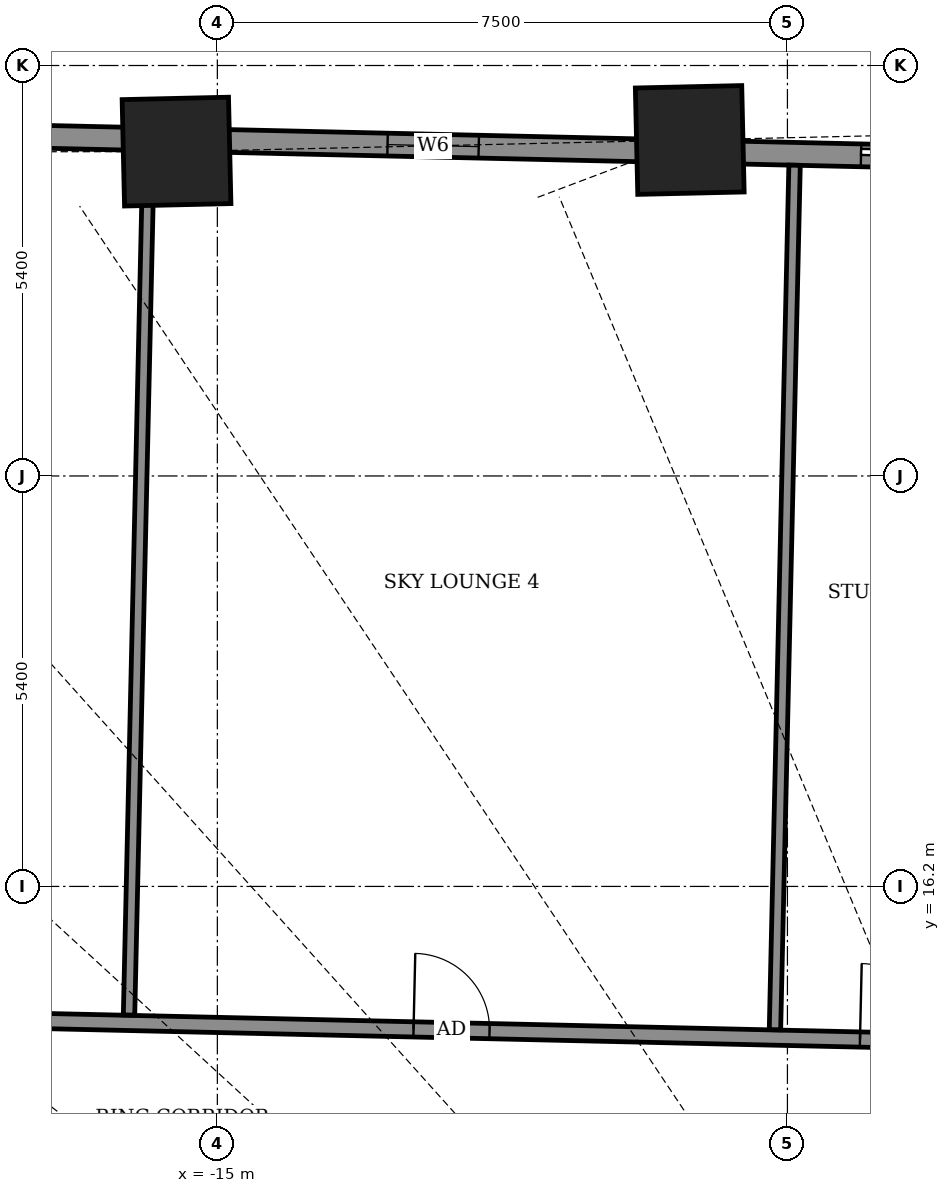
"""IFC4 building model, lengths in metres.
Left out: names, types, materials, properties, quantities, classifications, styles, units other than length and angle.
Written with IfcOpenShell. Run it as: python <this file> out.ifc"""

import sys

from ifc_helpers import new_model, si_unit, direction, frame, frame_2d, origin, origin_2d, place, context, subcontext, project, spatial, rectangle, extrude, element, fill, save


model = new_model("IFC4")
c1 = context("Model", 3, precision=1e-05, world=origin(), true_north=direction((0.0, 1.0)))
c2 = subcontext(c1, "Body", "Model", "MODEL_VIEW")
j1 = project(units=[si_unit("LENGTHUNIT", "METRE"), si_unit("PLANEANGLEUNIT", "RADIAN")], contexts=[c1])
p1 = place(None, origin())
s1 = spatial("IfcSite", under=j1, at=p1, CompositionType="ELEMENT")
p2 = place(p1, origin())
s2 = spatial("IfcBuilding", under=s1, at=p2, CompositionType="ELEMENT")
p3 = place(p2, frame((0.0, 0.0, 97.3)))
s3 = spatial("IfcBuildingStorey", under=s2, at=p3, CompositionType="ELEMENT", Elevation=97.3)
for number, where, z_axis, x_axis in (
    (1, (-8.785, 26.02, -0.55), (0.0, 0.0, 1.0), (-1.0, -0.023, 0.0)),
    (2, (-15.537, 25.867, -0.55), (0.0, 0.0, 1.0), (-1.0, -0.023, 0.0)),
):
    element("IfcColumn", number, at=place(p3, frame(where, z_axis=z_axis, x_axis=x_axis)), inside=s3, PredefinedType="COLUMN", context=c2, shape_type="SweptSolid", body=[
        extrude(rectangle(XDim=1.4, YDim=1.4, at=origin_2d()), origin(), (0.0, 0.0, 1.0), 4.6),
    ])
p4 = place(p3, frame((21.894, 25.173, 0.0), z_axis=(0.0, 0.0, 1.0), x_axis=(-0.999742661083, 0.022685052594, 0.0)))
e3 = element("IfcWall", 3, at=p4, inside=s3, PredefinedType="SOLIDWALL", context=c2, shape_type="SweptSolid", body=[
    extrude(rectangle(XDim=45.309, YDim=0.3, at=frame_2d((22.654, 0.0))), origin(), (0.0, 0.0, 1.0), 2.1),
])
p5 = place(p4, frame((0.788, 0.0, 0.0)))
e4 = element("IfcOpeningElement", 4, at=p5, cuts=e3, PredefinedType="OPENING", context=c2, shape_type="SweptSolid", body=[
    extrude(rectangle(XDim=1.5, YDim=2.0, at=frame_2d((0.75, 1.0))), frame((0.0, 0.16, 0.0), z_axis=(0.0, -1.0, 0.0), x_axis=(1.0, 0.0, 0.0)), (0.0, 0.0, 1.0), 0.32),
])
p6 = place(p4, frame((12.921, 0.0, 0.5)))
e5 = element("IfcOpeningElement", 5, at=p6, cuts=e3, PredefinedType="OPENING", context=c2, shape_type="SweptSolid", body=[
    extrude(rectangle(XDim=1.2, YDim=1.1, at=frame_2d((0.6, 0.55))), frame((0.0, 0.16, 0.0), z_axis=(0.0, -1.0, 0.0), x_axis=(1.0, 0.0, 0.0)), (0.0, 0.0, 1.0), 0.32),
])
p7 = place(p4, frame((18.618, 0.0, 0.0)))
e6 = element("IfcOpeningElement", 6, at=p7, cuts=e3, PredefinedType="OPENING", context=c2, shape_type="SweptSolid", body=[
    extrude(rectangle(XDim=1.5, YDim=2.0, at=frame_2d((0.75, 1.0))), frame((0.0, 0.16, 0.0), z_axis=(0.0, -1.0, 0.0), x_axis=(1.0, 0.0, 0.0)), (0.0, 0.0, 1.0), 0.32),
])
p8 = place(p4, frame((21.51, 0.0, 0.0)))
e7 = element("IfcOpeningElement", 7, at=p8, cuts=e3, PredefinedType="OPENING", context=c2, shape_type="SweptSolid", body=[
    extrude(rectangle(XDim=1.5, YDim=2.0, at=frame_2d((0.75, 1.0))), frame((0.0, 0.16, 0.0), z_axis=(0.0, -1.0, 0.0), x_axis=(1.0, 0.0, 0.0)), (0.0, 0.0, 1.0), 0.32),
])
p9 = place(p4, frame((26.933, 0.0, 0.0)))
e8 = element("IfcOpeningElement", 8, at=p9, cuts=e3, PredefinedType="OPENING", context=c2, shape_type="SweptSolid", body=[
    extrude(rectangle(XDim=1.5, YDim=2.0, at=frame_2d((0.75, 1.0))), frame((0.0, 0.16, 0.0), z_axis=(0.0, -1.0, 0.0), x_axis=(1.0, 0.0, 0.0)), (0.0, 0.0, 1.0), 0.32),
])
p10 = place(p4, frame((33.464, 0.0, 0.5)))
e9 = element("IfcOpeningElement", 9, at=p10, cuts=e3, PredefinedType="OPENING", context=c2, shape_type="SweptSolid", body=[
    extrude(rectangle(XDim=1.2, YDim=1.1, at=frame_2d((0.6, 0.55))), frame((0.0, 0.16, 0.0), z_axis=(0.0, -1.0, 0.0), x_axis=(1.0, 0.0, 0.0)), (0.0, 0.0, 1.0), 0.32),
])
p11 = place(p4, frame((39.878, 0.0, 0.5)))
e10 = element("IfcOpeningElement", 10, at=p11, cuts=e3, PredefinedType="OPENING", context=c2, shape_type="SweptSolid", body=[
    extrude(rectangle(XDim=1.2, YDim=1.1, at=frame_2d((0.6, 0.55))), frame((0.0, 0.16, 0.0), z_axis=(0.0, -1.0, 0.0), x_axis=(1.0, 0.0, 0.0)), (0.0, 0.0, 1.0), 0.32),
])
p12 = place(p3, frame((-23.695, 14.575, 0.0), z_axis=(0.0, 0.0, 1.0), x_axis=(0.999742555853, -0.022689689667, 0.0)))
e11 = element("IfcWall", 11, at=p12, inside=s3, PredefinedType="PARTITIONING", context=c2, shape_type="SweptSolid", body=[
    extrude(rectangle(XDim=48.086, YDim=0.2, at=frame_2d((24.043, 0.0))), origin(), (0.0, 0.0, 1.0), 2.1),
])
p13 = place(p12, frame((42.749, 0.0, 0.0)))
e12 = element("IfcOpeningElement", 12, at=p13, cuts=e11, PredefinedType="OPENING", context=c2, shape_type="SweptSolid", body=[
    extrude(rectangle(XDim=1.0, YDim=2.1, at=frame_2d((0.5, 1.05))), frame((0.0, 0.11, 0.0), z_axis=(0.0, -1.0, 0.0), x_axis=(1.0, 0.0, 0.0)), (0.0, 0.0, 1.0), 0.22),
])
p14 = place(p12, frame((34.254, 0.0, 0.0)))
e13 = element("IfcOpeningElement", 13, at=p14, cuts=e11, PredefinedType="OPENING", context=c2, shape_type="SweptSolid", body=[
    extrude(rectangle(XDim=1.0, YDim=2.1, at=frame_2d((0.5, 1.05))), frame((0.0, 0.11, 0.0), z_axis=(0.0, -1.0, 0.0), x_axis=(1.0, 0.0, 0.0)), (0.0, 0.0, 1.0), 0.22),
])
p15 = place(p12, frame((30.029, 0.0, 0.0)))
e14 = element("IfcOpeningElement", 14, at=p15, cuts=e11, PredefinedType="OPENING", context=c2, shape_type="SweptSolid", body=[
    extrude(rectangle(XDim=0.9, YDim=2.1, at=frame_2d((0.45, 1.05))), frame((0.0, 0.11, 0.0), z_axis=(0.0, -1.0, 0.0), x_axis=(1.0, 0.0, 0.0)), (0.0, 0.0, 1.0), 0.22),
])
p16 = place(p12, frame((25.129, 0.0, 0.0)))
e15 = element("IfcOpeningElement", 15, at=p16, cuts=e11, PredefinedType="OPENING", context=c2, shape_type="SweptSolid", body=[
    extrude(rectangle(XDim=0.9, YDim=2.1, at=frame_2d((0.45, 1.05))), frame((0.0, 0.11, 0.0), z_axis=(0.0, -1.0, 0.0), x_axis=(1.0, 0.0, 0.0)), (0.0, 0.0, 1.0), 0.22),
])
p17 = place(p12, frame((22.529, 0.0, 0.0)))
e16 = element("IfcOpeningElement", 16, at=p17, cuts=e11, PredefinedType="OPENING", context=c2, shape_type="SweptSolid", body=[
    extrude(rectangle(XDim=0.9, YDim=2.1, at=frame_2d((0.45, 1.05))), frame((0.0, 0.11, 0.0), z_axis=(0.0, -1.0, 0.0), x_axis=(1.0, 0.0, 0.0)), (0.0, 0.0, 1.0), 0.22),
])
p18 = place(p12, frame((17.154, 0.0, 0.0)))
e17 = element("IfcOpeningElement", 17, at=p18, cuts=e11, PredefinedType="OPENING", context=c2, shape_type="SweptSolid", body=[
    extrude(rectangle(XDim=1.0, YDim=2.1, at=frame_2d((0.5, 1.05))), frame((0.0, 0.11, 0.0), z_axis=(0.0, -1.0, 0.0), x_axis=(1.0, 0.0, 0.0)), (0.0, 0.0, 1.0), 0.22),
])
p19 = place(p12, frame((11.279, 0.0, 0.0)))
e18 = element("IfcOpeningElement", 18, at=p19, cuts=e11, PredefinedType="OPENING", context=c2, shape_type="SweptSolid", body=[
    extrude(rectangle(XDim=1.0, YDim=2.1, at=frame_2d((0.5, 1.05))), frame((0.0, 0.11, 0.0), z_axis=(0.0, -1.0, 0.0), x_axis=(1.0, 0.0, 0.0)), (0.0, 0.0, 1.0), 0.22),
])
p20 = place(p12, frame((1.321, 0.0, 0.0)))
e19 = element("IfcOpeningElement", 19, at=p20, cuts=e11, PredefinedType="OPENING", context=c2, shape_type="SweptSolid", body=[
    extrude(rectangle(XDim=1.0, YDim=2.1, at=frame_2d((0.5, 1.05))), frame((0.0, 0.11, 0.0), z_axis=(0.0, -1.0, 0.0), x_axis=(1.0, 0.0, 0.0)), (0.0, 0.0, 1.0), 0.22),
])
p21 = place(p3, frame((-16.162, 14.508, 0.0), z_axis=(0.0, 0.0, 1.0), x_axis=(0.022684355347, 0.999742676904, 0.0)))
e20 = element("IfcWall", 20, at=p21, inside=s3, PredefinedType="PARTITIONING", context=c2, shape_type="SweptSolid", body=[
    extrude(rectangle(XDim=11.376, YDim=0.15, at=frame_2d((5.688, 0.0))), origin(), (0.0, 0.0, 1.0), 2.35),
])
p22 = place(p3, frame((-7.664, 14.315, 0.0), z_axis=(0.0, 0.0, 1.0), x_axis=(0.022684355347, 0.999742676904, 0.0)))
e21 = element("IfcWall", 21, at=p22, inside=s3, PredefinedType="PARTITIONING", context=c2, shape_type="SweptSolid", body=[
    extrude(rectangle(XDim=11.376, YDim=0.15, at=frame_2d((5.688, 0.0))), origin(), (0.0, 0.0, 1.0), 2.55),
])
p23 = place(p9, origin())
e22 = element("IfcDoor", 22, at=p23, inside=s3, OperationType="SLIDING_TO_LEFT", PredefinedType="DOOR", context=c2, shape_type="SweptSolid", body=[
    extrude(rectangle(XDim=1.5, YDim=2.0, at=frame_2d((0.75, 1.0))), frame((0.0, 0.025, 0.0), z_axis=(0.0, -1.0, 0.0), x_axis=(1.0, 0.0, 0.0)), (0.0, 0.0, 1.0), 0.05),
])
fill(e8, e22)
p24 = place(p10, origin())
e23 = element("IfcWindow", 23, at=p24, inside=s3, PartitioningType="SINGLE_PANEL", PredefinedType="WINDOW", context=c2, shape_type="SweptSolid", body=[
    extrude(rectangle(XDim=1.2, YDim=1.1, at=frame_2d((0.6, 0.55))), frame((0.0, 0.03, 0.0), z_axis=(0.0, -1.0, 0.0), x_axis=(1.0, 0.0, 0.0)), (0.0, 0.0, 1.0), 0.06),
])
fill(e9, e23)
p25 = place(p18, origin())
e24 = element("IfcDoor", 24, at=p25, inside=s3, OperationType="SINGLE_SWING_LEFT", PredefinedType="DOOR", context=c2, shape_type="SweptSolid", body=[
    extrude(rectangle(XDim=1.0, YDim=2.1, at=frame_2d((0.5, 1.05))), frame((0.0, 0.025, 0.0), z_axis=(0.0, -1.0, 0.0), x_axis=(1.0, 0.0, 0.0)), (0.0, 0.0, 1.0), 0.05),
])
fill(e17, e24)
p26 = place(p19, origin())
e25 = element("IfcDoor", 25, at=p26, inside=s3, OperationType="SINGLE_SWING_RIGHT", PredefinedType="DOOR", context=c2, shape_type="SweptSolid", body=[
    extrude(rectangle(XDim=1.0, YDim=2.1, at=frame_2d((0.5, 1.05))), frame((0.0, 0.025, 0.0), z_axis=(0.0, -1.0, 0.0), x_axis=(1.0, 0.0, 0.0)), (0.0, 0.0, 1.0), 0.05),
])
fill(e18, e25)
save(model, sys.argv[1])
